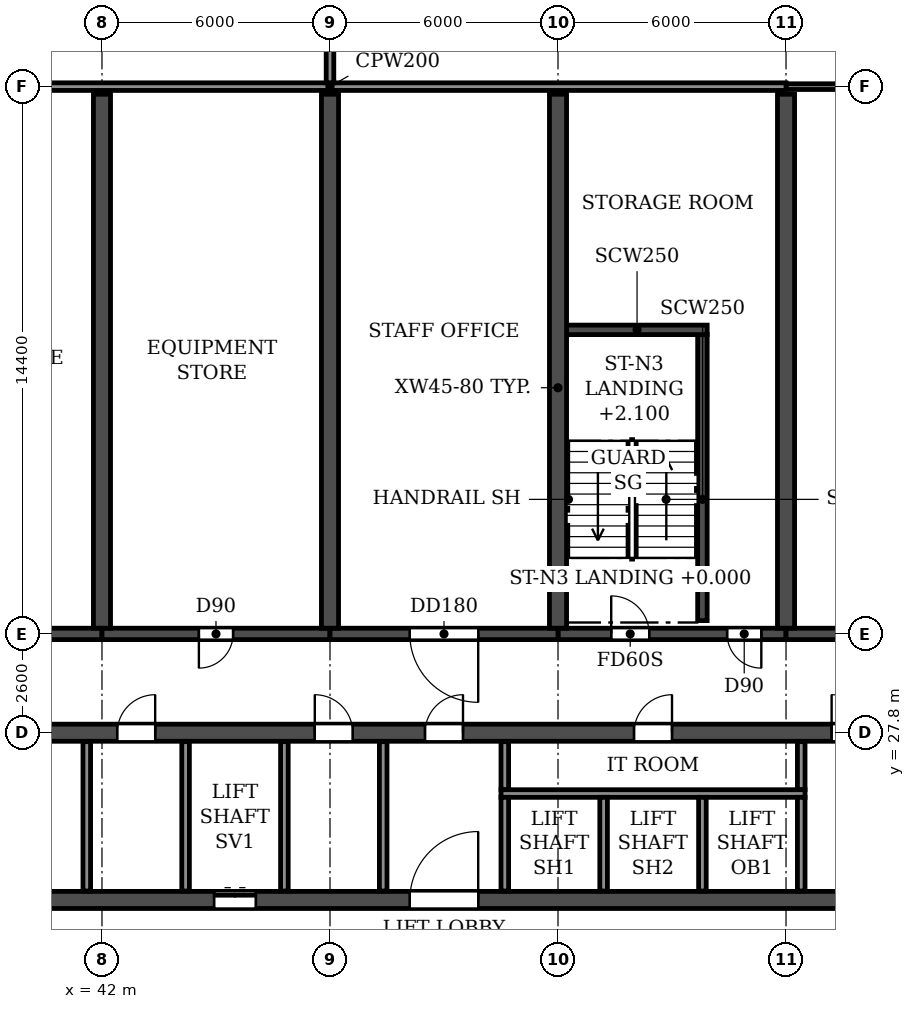
"""IFC4 building model, lengths in metres.
Left out: names, types, materials, properties, quantities, classifications, styles, units other than length and angle.
Written with IfcOpenShell. Run it as: python <this file> out.ifc"""

import sys

from ifc_helpers import new_model, si_unit, direction, frame, frame_2d, origin, place, context, subcontext, project, spatial, rectangle, extrude, element, fill, save


model = new_model("IFC4")
c1 = context("Model", 3, precision=1e-05, world=origin(), true_north=direction((0.0, 1.0)))
c2 = subcontext(c1, "Body", "Model", "MODEL_VIEW")
j1 = project(units=[si_unit("LENGTHUNIT", "METRE"), si_unit("PLANEANGLEUNIT", "RADIAN")], contexts=[c1])
p1 = place(None, origin())
s1 = spatial("IfcSite", under=j1, at=p1, CompositionType="ELEMENT")
p2 = place(p1, origin())
s2 = spatial("IfcBuilding", under=s1, at=p2, CompositionType="ELEMENT")
p3 = place(p2, frame((0.0, 0.0, 10.8)))
s3 = spatial("IfcBuildingStorey", under=s2, at=p3, CompositionType="ELEMENT", Elevation=10.8)
for number, where, z_axis, x_axis in (
    (1, (42.0, 30.55, 0.0), (0.0, 0.0, 1.0), (0.0, 1.0, 0.0)),
    (2, (48.0, 30.55, 0.0), (0.0, 0.0, 1.0), (0.0, 1.0, 0.0)),
    (3, (54.0, 30.55, 0.0), (0.0, 0.0, 1.0), (0.0, 1.0, 0.0)),
    (4, (60.0, 30.55, 0.0), (0.0, 0.0, 1.0), (0.0, 1.0, 0.0)),
):
    element("IfcWall", number, at=place(p3, frame(where, z_axis=z_axis, x_axis=x_axis)), inside=s3, PredefinedType="SHEAR", context=c2, shape_type="SweptSolid", body=[
        extrude(rectangle(XDim=14.05, YDim=0.45, at=frame_2d((7.025, 0.0))), origin(), (0.0, 0.0, 1.0), 3.92),
    ])
p4 = place(p3, frame((36.0, 30.4, 0.0), z_axis=(0.0, 0.0, 1.0), x_axis=(1.0, 0.0, 0.0)))
e5 = element("IfcWall", 5, at=p4, inside=s3, PredefinedType="SHEAR", context=c2, shape_type="SweptSolid", body=[
    extrude(rectangle(XDim=6.0, YDim=0.3, at=frame_2d((3.0, 0.0))), origin(), (0.0, 0.0, 1.0), 3.32),
])
p5 = place(p4, frame((2.1, 0.0, 0.0)))
e6 = element("IfcOpeningElement", 6, at=p5, cuts=e5, PredefinedType="OPENING", context=c2, shape_type="SweptSolid", body=[
    extrude(rectangle(XDim=1.8, YDim=2.1, at=frame_2d((0.9, 1.05))), frame((0.0, 0.16, 0.0), z_axis=(0.0, -1.0, 0.0), x_axis=(1.0, 0.0, 0.0)), (0.0, 0.0, 1.0), 0.32),
])
p6 = place(p3, frame((42.0, 30.4, 0.0), z_axis=(0.0, 0.0, 1.0), x_axis=(1.0, 0.0, 0.0)))
e7 = element("IfcWall", 7, at=p6, inside=s3, PredefinedType="SHEAR", context=c2, shape_type="SweptSolid", body=[
    extrude(rectangle(XDim=6.0, YDim=0.3, at=frame_2d((3.0, 0.0))), origin(), (0.0, 0.0, 1.0), 3.32),
])
p7 = place(p6, frame((2.55, 0.0, 0.0)))
e8 = element("IfcOpeningElement", 8, at=p7, cuts=e7, PredefinedType="OPENING", context=c2, shape_type="SweptSolid", body=[
    extrude(rectangle(XDim=0.9, YDim=2.1, at=frame_2d((0.45, 1.05))), frame((0.0, 0.16, 0.0), z_axis=(0.0, -1.0, 0.0), x_axis=(1.0, 0.0, 0.0)), (0.0, 0.0, 1.0), 0.32),
])
p8 = place(p3, frame((48.0, 30.4, 0.0), z_axis=(0.0, 0.0, 1.0), x_axis=(1.0, 0.0, 0.0)))
e9 = element("IfcWall", 9, at=p8, inside=s3, PredefinedType="SHEAR", context=c2, shape_type="SweptSolid", body=[
    extrude(rectangle(XDim=6.0, YDim=0.3, at=frame_2d((3.0, 0.0))), origin(), (0.0, 0.0, 1.0), 3.32),
])
p9 = place(p8, frame((2.1, 0.0, 0.0)))
e10 = element("IfcOpeningElement", 10, at=p9, cuts=e9, PredefinedType="OPENING", context=c2, shape_type="SweptSolid", body=[
    extrude(rectangle(XDim=1.8, YDim=2.1, at=frame_2d((0.9, 1.05))), frame((0.0, 0.16, 0.0), z_axis=(0.0, -1.0, 0.0), x_axis=(1.0, 0.0, 0.0)), (0.0, 0.0, 1.0), 0.32),
])
p10 = place(p3, frame((54.0, 30.4, 0.0), z_axis=(0.0, 0.0, 1.0), x_axis=(1.0, 0.0, 0.0)))
e11 = element("IfcWall", 11, at=p10, inside=s3, PredefinedType="SHEAR", context=c2, shape_type="SweptSolid", body=[
    extrude(rectangle(XDim=6.0, YDim=0.3, at=frame_2d((3.0, 0.0))), origin(), (0.0, 0.0, 1.0), 3.32),
])
p11 = place(p10, frame((1.4, 0.0, 0.0)))
e12 = element("IfcOpeningElement", 12, at=p11, cuts=e11, PredefinedType="OPENING", context=c2, shape_type="SweptSolid", body=[
    extrude(rectangle(XDim=1.0, YDim=2.1, at=frame_2d((0.5, 1.05))), frame((0.0, 0.16, 0.0), z_axis=(0.0, -1.0, 0.0), x_axis=(1.0, 0.0, 0.0)), (0.0, 0.0, 1.0), 0.32),
])
p12 = place(p10, frame((4.45, 0.0, 0.0)))
e13 = element("IfcOpeningElement", 13, at=p12, cuts=e11, PredefinedType="OPENING", context=c2, shape_type="SweptSolid", body=[
    extrude(rectangle(XDim=0.9, YDim=2.1, at=frame_2d((0.45, 1.05))), frame((0.0, 0.16, 0.0), z_axis=(0.0, -1.0, 0.0), x_axis=(1.0, 0.0, 0.0)), (0.0, 0.0, 1.0), 0.32),
])
p13 = place(p3, frame((60.0, 30.4, 0.0), z_axis=(0.0, 0.0, 1.0), x_axis=(1.0, 0.0, 0.0)))
e14 = element("IfcWall", 14, at=p13, inside=s3, PredefinedType="SHEAR", context=c2, shape_type="SweptSolid", body=[
    extrude(rectangle(XDim=6.0, YDim=0.3, at=frame_2d((3.0, 0.0))), origin(), (0.0, 0.0, 1.0), 3.32),
])
p14 = place(p13, frame((2.55, 0.0, 0.0)))
e15 = element("IfcOpeningElement", 15, at=p14, cuts=e14, PredefinedType="OPENING", context=c2, shape_type="SweptSolid", body=[
    extrude(rectangle(XDim=0.9, YDim=2.1, at=frame_2d((0.45, 1.05))), frame((0.0, 0.16, 0.0), z_axis=(0.0, -1.0, 0.0), x_axis=(1.0, 0.0, 0.0)), (0.0, 0.0, 1.0), 0.32),
])
p15 = place(p3, frame((18.0, 27.8, 0.0), z_axis=(0.0, 0.0, 1.0), x_axis=(1.0, 0.0, 0.0)))
e16 = element("IfcWall", 16, at=p15, inside=s3, PredefinedType="SOLIDWALL", context=c2, shape_type="SweptSolid", body=[
    extrude(rectangle(XDim=66.0, YDim=0.45, at=frame_2d((33.0, 0.0))), origin(), (0.0, 0.0, 1.0), 3.92),
])
p16 = place(p15, frame((0.9, 0.0, 0.0)))
e17 = element("IfcOpeningElement", 17, at=p16, cuts=e16, PredefinedType="OPENING", context=c2, shape_type="SweptSolid", body=[
    extrude(rectangle(XDim=1.0, YDim=2.1, at=frame_2d((0.5, 1.05))), frame((0.0, 0.235, 0.0), z_axis=(0.0, -1.0, 0.0), x_axis=(1.0, 0.0, 0.0)), (0.0, 0.0, 1.0), 0.47),
])
p17 = place(p15, frame((4.25, 0.0, 0.0)))
e18 = element("IfcOpeningElement", 18, at=p17, cuts=e16, PredefinedType="OPENING", context=c2, shape_type="SweptSolid", body=[
    extrude(rectangle(XDim=0.9, YDim=2.1, at=frame_2d((0.45, 1.05))), frame((0.0, 0.235, 0.0), z_axis=(0.0, -1.0, 0.0), x_axis=(1.0, 0.0, 0.0)), (0.0, 0.0, 1.0), 0.47),
])
p18 = place(p15, frame((8.85, 0.0, 0.0)))
e19 = element("IfcOpeningElement", 19, at=p18, cuts=e16, PredefinedType="OPENING", context=c2, shape_type="SweptSolid", body=[
    extrude(rectangle(XDim=0.9, YDim=2.1, at=frame_2d((0.45, 1.05))), frame((0.0, 0.235, 0.0), z_axis=(0.0, -1.0, 0.0), x_axis=(1.0, 0.0, 0.0)), (0.0, 0.0, 1.0), 0.47),
])
p19 = place(p15, frame((13.45, 0.0, 0.0)))
e20 = element("IfcOpeningElement", 20, at=p19, cuts=e16, PredefinedType="OPENING", context=c2, shape_type="SweptSolid", body=[
    extrude(rectangle(XDim=0.9, YDim=2.1, at=frame_2d((0.45, 1.05))), frame((0.0, 0.235, 0.0), z_axis=(0.0, -1.0, 0.0), x_axis=(1.0, 0.0, 0.0)), (0.0, 0.0, 1.0), 0.47),
])
p20 = place(p15, frame((18.95, 0.0, 0.0)))
e21 = element("IfcOpeningElement", 21, at=p20, cuts=e16, PredefinedType="OPENING", context=c2, shape_type="SweptSolid", body=[
    extrude(rectangle(XDim=1.5, YDim=2.1, at=frame_2d((0.75, 1.05))), frame((0.0, 0.235, 0.0), z_axis=(0.0, -1.0, 0.0), x_axis=(1.0, 0.0, 0.0)), (0.0, 0.0, 1.0), 0.47),
])
p21 = place(p15, frame((24.4, 0.0, 0.0)))
e22 = element("IfcOpeningElement", 22, at=p21, cuts=e16, PredefinedType="OPENING", context=c2, shape_type="SweptSolid", body=[
    extrude(rectangle(XDim=1.0, YDim=2.1, at=frame_2d((0.5, 1.05))), frame((0.0, 0.235, 0.0), z_axis=(0.0, -1.0, 0.0), x_axis=(1.0, 0.0, 0.0)), (0.0, 0.0, 1.0), 0.47),
])
p22 = place(p15, frame((29.6, 0.0, 0.0)))
e23 = element("IfcOpeningElement", 23, at=p22, cuts=e16, PredefinedType="OPENING", context=c2, shape_type="SweptSolid", body=[
    extrude(rectangle(XDim=1.0, YDim=2.1, at=frame_2d((0.5, 1.05))), frame((0.0, 0.235, 0.0), z_axis=(0.0, -1.0, 0.0), x_axis=(1.0, 0.0, 0.0)), (0.0, 0.0, 1.0), 0.47),
])
p23 = place(p15, frame((32.5, 0.0, 0.0)))
e24 = element("IfcOpeningElement", 24, at=p23, cuts=e16, PredefinedType="OPENING", context=c2, shape_type="SweptSolid", body=[
    extrude(rectangle(XDim=1.0, YDim=2.1, at=frame_2d((0.5, 1.05))), frame((0.0, 0.235, 0.0), z_axis=(0.0, -1.0, 0.0), x_axis=(1.0, 0.0, 0.0)), (0.0, 0.0, 1.0), 0.47),
])
p24 = place(p15, frame((38.0, 0.0, 0.0)))
e25 = element("IfcOpeningElement", 25, at=p24, cuts=e16, PredefinedType="OPENING", context=c2, shape_type="SweptSolid", body=[
    extrude(rectangle(XDim=1.0, YDim=2.1, at=frame_2d((0.5, 1.05))), frame((0.0, 0.235, 0.0), z_axis=(0.0, -1.0, 0.0), x_axis=(1.0, 0.0, 0.0)), (0.0, 0.0, 1.0), 0.47),
])
p25 = place(p15, frame((43.2, 0.0, 0.0)))
e26 = element("IfcOpeningElement", 26, at=p25, cuts=e16, PredefinedType="OPENING", context=c2, shape_type="SweptSolid", body=[
    extrude(rectangle(XDim=1.0, YDim=2.1, at=frame_2d((0.5, 1.05))), frame((0.0, 0.235, 0.0), z_axis=(0.0, -1.0, 0.0), x_axis=(1.0, 0.0, 0.0)), (0.0, 0.0, 1.0), 0.47),
])
p26 = place(p15, frame((47.1, 0.0, 0.0)))
e27 = element("IfcOpeningElement", 27, at=p26, cuts=e16, PredefinedType="OPENING", context=c2, shape_type="SweptSolid", body=[
    extrude(rectangle(XDim=1.0, YDim=2.1, at=frame_2d((0.5, 1.05))), frame((0.0, 0.235, 0.0), z_axis=(0.0, -1.0, 0.0), x_axis=(1.0, 0.0, 0.0)), (0.0, 0.0, 1.0), 0.47),
])
p27 = place(p15, frame((51.65, 0.0, 0.0)))
e28 = element("IfcOpeningElement", 28, at=p27, cuts=e16, PredefinedType="OPENING", context=c2, shape_type="SweptSolid", body=[
    extrude(rectangle(XDim=0.9, YDim=2.1, at=frame_2d((0.45, 1.05))), frame((0.0, 0.235, 0.0), z_axis=(0.0, -1.0, 0.0), x_axis=(1.0, 0.0, 0.0)), (0.0, 0.0, 1.0), 0.47),
])
p28 = place(p15, frame((56.2, 0.0, 0.0)))
e29 = element("IfcOpeningElement", 29, at=p28, cuts=e16, PredefinedType="OPENING", context=c2, shape_type="SweptSolid", body=[
    extrude(rectangle(XDim=1.0, YDim=2.1, at=frame_2d((0.5, 1.05))), frame((0.0, 0.235, 0.0), z_axis=(0.0, -1.0, 0.0), x_axis=(1.0, 0.0, 0.0)), (0.0, 0.0, 1.0), 0.47),
])
p29 = place(p15, frame((60.85, 0.0, 0.0)))
e30 = element("IfcOpeningElement", 30, at=p29, cuts=e16, PredefinedType="OPENING", context=c2, shape_type="SweptSolid", body=[
    extrude(rectangle(XDim=0.9, YDim=2.1, at=frame_2d((0.45, 1.05))), frame((0.0, 0.235, 0.0), z_axis=(0.0, -1.0, 0.0), x_axis=(1.0, 0.0, 0.0)), (0.0, 0.0, 1.0), 0.47),
])
p30 = place(p15, frame((64.1, 0.0, 0.0)))
e31 = element("IfcOpeningElement", 31, at=p30, cuts=e16, PredefinedType="OPENING", context=c2, shape_type="SweptSolid", body=[
    extrude(rectangle(XDim=1.0, YDim=2.1, at=frame_2d((0.5, 1.05))), frame((0.0, 0.235, 0.0), z_axis=(0.0, -1.0, 0.0), x_axis=(1.0, 0.0, 0.0)), (0.0, 0.0, 1.0), 0.47),
])
p31 = place(p3, frame((33.925, 23.4, 0.0), z_axis=(0.0, 0.0, 1.0), x_axis=(1.0, 0.0, 0.0)))
e32 = element("IfcWall", 32, at=p31, inside=s3, PredefinedType="SOLIDWALL", context=c2, shape_type="SweptSolid", body=[
    extrude(rectangle(XDim=34.15, YDim=0.45, at=frame_2d((17.075, 0.0))), origin(), (0.0, 0.0, 1.0), 3.92),
])
p32 = place(p31, frame((16.175, 0.0, 0.0)))
e33 = element("IfcOpeningElement", 33, at=p32, cuts=e32, PredefinedType="OPENING", context=c2, shape_type="SweptSolid", body=[
    extrude(rectangle(XDim=1.8, YDim=2.1, at=frame_2d((0.9, 1.05))), frame((0.0, 0.235, 0.0), z_axis=(0.0, -1.0, 0.0), x_axis=(1.0, 0.0, 0.0)), (0.0, 0.0, 1.0), 0.47),
])
p33 = place(p31, frame((11.025, 0.0, 0.0)))
e34 = element("IfcOpeningElement", 34, at=p33, cuts=e32, PredefinedType="OPENING", context=c2, shape_type="SweptSolid", body=[
    extrude(rectangle(XDim=1.1, YDim=2.1, at=frame_2d((0.55, 1.05))), frame((0.0, 0.235, 0.0), z_axis=(0.0, -1.0, 0.0), x_axis=(1.0, 0.0, 0.0)), (0.0, 0.0, 1.0), 0.47),
])
p34 = place(p31, frame((29.825, 0.0, 0.0)))
e35 = element("IfcOpeningElement", 35, at=p34, cuts=e32, PredefinedType="OPENING", context=c2, shape_type="SweptSolid", body=[
    extrude(rectangle(XDim=1.1, YDim=2.1, at=frame_2d((0.55, 1.05))), frame((0.0, 0.235, 0.0), z_axis=(0.0, -1.0, 0.0), x_axis=(1.0, 0.0, 0.0)), (0.0, 0.0, 1.0), 0.47),
])
p35 = place(p31, frame((32.425, 0.0, 0.0)))
e36 = element("IfcOpeningElement", 36, at=p35, cuts=e32, PredefinedType="OPENING", context=c2, shape_type="SweptSolid", body=[
    extrude(rectangle(XDim=1.1, YDim=2.1, at=frame_2d((0.55, 1.05))), frame((0.0, 0.235, 0.0), z_axis=(0.0, -1.0, 0.0), x_axis=(1.0, 0.0, 0.0)), (0.0, 0.0, 1.0), 0.47),
])
p36 = place(p3, frame((57.8, 30.75, 0.0), z_axis=(0.0, 0.0, 1.0), x_axis=(0.0, 1.0, 0.0)))
e37 = element("IfcWall", 37, at=p36, inside=s3, PredefinedType="SOLIDWALL", context=c2, shape_type="SweptSolid", body=[
    extrude(rectangle(XDim=7.525, YDim=0.25, at=frame_2d((3.762, 0.0))), origin(), (0.0, 0.0, 1.0), 3.92),
])
p37 = place(p3, frame((54.0, 38.4, 0.0), z_axis=(0.0, 0.0, 1.0), x_axis=(1.0, 0.0, 0.0)))
e38 = element("IfcWall", 38, at=p37, inside=s3, PredefinedType="SOLIDWALL", context=c2, shape_type="SweptSolid", body=[
    extrude(rectangle(XDim=3.925, YDim=0.25, at=frame_2d((1.962, 0.0))), origin(), (0.0, 0.0, 1.0), 3.92),
])
p38 = place(p3, frame((60.0, 44.8, 0.0), z_axis=(0.0, 0.0, 1.0), x_axis=(1.0, 0.0, 0.0)))
e39 = element("IfcWall", 39, at=p38, inside=s3, PredefinedType="PARTITIONING", context=c2, shape_type="SweptSolid", body=[
    extrude(rectangle(XDim=6.0, YDim=0.15, at=frame_2d((3.0, 0.0))), origin(), (0.0, 0.0, 1.0), 3.92),
])
p39 = place(p38, frame((2.1, 0.0, 0.0)))
e40 = element("IfcOpeningElement", 40, at=p39, cuts=e39, PredefinedType="OPENING", context=c2, shape_type="SweptSolid", body=[
    extrude(rectangle(XDim=1.8, YDim=2.1, at=frame_2d((0.9, 1.05))), frame((0.0, 0.085, 0.0), z_axis=(0.0, -1.0, 0.0), x_axis=(1.0, 0.0, 0.0)), (0.0, 0.0, 1.0), 0.17),
])
for number, where, z_axis, x_axis in (
    (41, (41.6, 23.635, 0.0), (0.0, 0.0, 1.0), (0.0, 1.0, 0.0)),
    (42, (49.4, 23.635, 0.0), (0.0, 0.0, 1.0), (0.0, 1.0, 0.0)),
):
    element("IfcWall", number, at=place(p3, frame(where, z_axis=z_axis, x_axis=x_axis)), inside=s3, PredefinedType="PARTITIONING", context=c2, shape_type="SweptSolid", body=[
        extrude(rectangle(XDim=3.93, YDim=0.2, at=frame_2d((1.965, 0.0))), origin(), (0.0, 0.0, 1.0), 3.92),
    ])
for number, where, z_axis, x_axis in (
    (43, (52.6, 26.3, 0.0), (0.0, 0.0, 1.0), (0.0, 1.0, 0.0)),
    (44, (60.4, 26.3, 0.0), (0.0, 0.0, 1.0), (0.0, 1.0, 0.0)),
):
    element("IfcWall", number, at=place(p3, frame(where, z_axis=z_axis, x_axis=x_axis)), inside=s3, PredefinedType="PARTITIONING", context=c2, shape_type="SweptSolid", body=[
        extrude(rectangle(XDim=1.265, YDim=0.2, at=frame_2d((0.632, 0.0))), origin(), (0.0, 0.0, 1.0), 3.92),
    ])
p40 = place(p3, frame((36.0, 44.8, 0.0), z_axis=(0.0, 0.0, 1.0), x_axis=(1.0, 0.0, 0.0)))
e45 = element("IfcWall", 45, at=p40, inside=s3, PredefinedType="PARTITIONING", context=c2, shape_type="SweptSolid", body=[
    extrude(rectangle(XDim=24.0, YDim=0.2, at=frame_2d((12.0, 0.0))), origin(), (0.0, 0.0, 1.0), 3.92),
])
p41 = place(p3, frame((48.0, 44.9, 0.0), z_axis=(0.0, 0.0, 1.0), x_axis=(0.0, 1.0, 0.0)))
e46 = element("IfcWall", 46, at=p41, inside=s3, PredefinedType="PARTITIONING", context=c2, shape_type="SweptSolid", body=[
    extrude(rectangle(XDim=17.84, YDim=0.2, at=frame_2d((8.92, 0.0))), origin(), (0.0, 0.0, 1.0), 3.92),
])
p42 = place(p3, frame((52.5, 26.2, 0.0), z_axis=(0.0, 0.0, 1.0), x_axis=(1.0, 0.0, 0.0)))
e47 = element("IfcWall", 47, at=p42, inside=s3, PredefinedType="PARTITIONING", context=c2, shape_type="SweptSolid", body=[
    extrude(rectangle(XDim=8.0, YDim=0.2, at=frame_2d((4.0, 0.0))), origin(), (0.0, 0.0, 1.0), 3.92),
])
for number, where, z_axis, x_axis in (
    (48, (44.2, 23.635, 0.0), (0.0, 0.0, 1.0), (0.0, 1.0, 0.0)),
    (49, (46.8, 23.635, 0.0), (0.0, 0.0, 1.0), (0.0, 1.0, 0.0)),
):
    element("IfcWall", number, at=place(p3, frame(where, z_axis=z_axis, x_axis=x_axis)), inside=s3, PredefinedType="PARTITIONING", context=c2, shape_type="SweptSolid", body=[
        extrude(rectangle(XDim=3.93, YDim=0.2, at=frame_2d((1.965, 0.0))), origin(), (0.0, 0.0, 1.0), 3.92),
    ])
for number, where, z_axis, x_axis in (
    (50, (52.6, 23.635, 0.0), (0.0, 0.0, 1.0), (0.0, 1.0, 0.0)),
    (51, (55.2, 23.635, 0.0), (0.0, 0.0, 1.0), (0.0, 1.0, 0.0)),
    (52, (57.8, 23.635, 0.0), (0.0, 0.0, 1.0), (0.0, 1.0, 0.0)),
    (53, (60.4, 23.635, 0.0), (0.0, 0.0, 1.0), (0.0, 1.0, 0.0)),
):
    element("IfcWall", number, at=place(p3, frame(where, z_axis=z_axis, x_axis=x_axis)), inside=s3, PredefinedType="PARTITIONING", context=c2, shape_type="SweptSolid", body=[
        extrude(rectangle(XDim=2.465, YDim=0.2, at=frame_2d((1.232, 0.0))), origin(), (0.0, 0.0, 1.0), 3.92),
    ])
p43 = place(p21, origin())
e54 = element("IfcDoor", 54, at=p43, inside=s3, OperationType="SINGLE_SWING_RIGHT", PredefinedType="DOOR", context=c2, shape_type="SweptSolid", body=[
    extrude(rectangle(XDim=1.0, YDim=2.1, at=frame_2d((0.5, 1.05))), frame((0.0, 0.025, 0.0), z_axis=(0.0, -1.0, 0.0), x_axis=(1.0, 0.0, 0.0)), (0.0, 0.0, 1.0), 0.05),
])
fill(e22, e54)
p44 = place(p7, frame((0.9, 0.0, 0.0), z_axis=(0.0, 0.0, 1.0), x_axis=(-1.0, 0.0, 0.0)))
e55 = element("IfcDoor", 55, at=p44, inside=s3, OperationType="SINGLE_SWING_RIGHT", PredefinedType="DOOR", context=c2, shape_type="SweptSolid", body=[
    extrude(rectangle(XDim=0.9, YDim=2.1, at=frame_2d((0.45, 1.05))), frame((0.0, 0.025, 0.0), z_axis=(0.0, -1.0, 0.0), x_axis=(1.0, 0.0, 0.0)), (0.0, 0.0, 1.0), 0.05),
])
fill(e8, e55)
p45 = place(p22, origin())
e56 = element("IfcDoor", 56, at=p45, inside=s3, OperationType="SINGLE_SWING_LEFT", PredefinedType="DOOR", context=c2, shape_type="SweptSolid", body=[
    extrude(rectangle(XDim=1.0, YDim=2.1, at=frame_2d((0.5, 1.05))), frame((0.0, 0.025, 0.0), z_axis=(0.0, -1.0, 0.0), x_axis=(1.0, 0.0, 0.0)), (0.0, 0.0, 1.0), 0.05),
])
fill(e23, e56)
p46 = place(p23, origin())
e57 = element("IfcDoor", 57, at=p46, inside=s3, OperationType="SINGLE_SWING_RIGHT", PredefinedType="DOOR", context=c2, shape_type="SweptSolid", body=[
    extrude(rectangle(XDim=1.0, YDim=2.1, at=frame_2d((0.5, 1.05))), frame((0.0, 0.025, 0.0), z_axis=(0.0, -1.0, 0.0), x_axis=(1.0, 0.0, 0.0)), (0.0, 0.0, 1.0), 0.05),
])
fill(e24, e57)
p47 = place(p9, frame((1.8, 0.0, 0.0), z_axis=(0.0, 0.0, 1.0), x_axis=(-1.0, 0.0, 0.0)))
e58 = element("IfcDoor", 58, at=p47, inside=s3, OperationType="DOUBLE_DOOR_SINGLE_SWING", PredefinedType="DOOR", context=c2, shape_type="SweptSolid", body=[
    extrude(rectangle(XDim=1.8, YDim=2.1, at=frame_2d((0.9, 1.05))), frame((0.0, 0.025, 0.0), z_axis=(0.0, -1.0, 0.0), x_axis=(1.0, 0.0, 0.0)), (0.0, 0.0, 1.0), 0.05),
])
fill(e10, e58)
p48 = place(p11, origin())
e59 = element("IfcDoor", 59, at=p48, inside=s3, OperationType="SINGLE_SWING_LEFT", PredefinedType="DOOR", context=c2, shape_type="SweptSolid", body=[
    extrude(rectangle(XDim=1.0, YDim=2.1, at=frame_2d((0.5, 1.05))), frame((0.0, 0.025, 0.0), z_axis=(0.0, -1.0, 0.0), x_axis=(1.0, 0.0, 0.0)), (0.0, 0.0, 1.0), 0.05),
])
fill(e12, e59)
p49 = place(p24, origin())
e60 = element("IfcDoor", 60, at=p49, inside=s3, OperationType="SINGLE_SWING_RIGHT", PredefinedType="DOOR", context=c2, shape_type="SweptSolid", body=[
    extrude(rectangle(XDim=1.0, YDim=2.1, at=frame_2d((0.5, 1.05))), frame((0.0, 0.025, 0.0), z_axis=(0.0, -1.0, 0.0), x_axis=(1.0, 0.0, 0.0)), (0.0, 0.0, 1.0), 0.05),
])
fill(e25, e60)
p50 = place(p12, frame((0.9, 0.0, 0.0), z_axis=(0.0, 0.0, 1.0), x_axis=(-1.0, 0.0, 0.0)))
e61 = element("IfcDoor", 61, at=p50, inside=s3, OperationType="SINGLE_SWING_LEFT", PredefinedType="DOOR", context=c2, shape_type="SweptSolid", body=[
    extrude(rectangle(XDim=0.9, YDim=2.1, at=frame_2d((0.45, 1.05))), frame((0.0, 0.025, 0.0), z_axis=(0.0, -1.0, 0.0), x_axis=(1.0, 0.0, 0.0)), (0.0, 0.0, 1.0), 0.05),
])
fill(e13, e61)
p51 = place(p25, origin())
e62 = element("IfcDoor", 62, at=p51, inside=s3, OperationType="SINGLE_SWING_LEFT", PredefinedType="DOOR", context=c2, shape_type="SweptSolid", body=[
    extrude(rectangle(XDim=1.0, YDim=2.1, at=frame_2d((0.5, 1.05))), frame((0.0, 0.025, 0.0), z_axis=(0.0, -1.0, 0.0), x_axis=(1.0, 0.0, 0.0)), (0.0, 0.0, 1.0), 0.05),
])
fill(e26, e62)
p52 = place(p32, origin())
e63 = element("IfcDoor", 63, at=p52, inside=s3, OperationType="DOUBLE_DOOR_SINGLE_SWING", PredefinedType="DOOR", context=c2, shape_type="SweptSolid", body=[
    extrude(rectangle(XDim=1.8, YDim=2.1, at=frame_2d((0.9, 1.05))), frame((0.0, 0.025, 0.0), z_axis=(0.0, -1.0, 0.0), x_axis=(1.0, 0.0, 0.0)), (0.0, 0.0, 1.0), 0.05),
])
fill(e33, e63)
p53 = place(p33, origin())
e64 = element("IfcDoor", 64, at=p53, inside=s3, OperationType="DOUBLE_DOOR_SLIDING", PredefinedType="DOOR", context=c2, shape_type="SweptSolid", body=[
    extrude(rectangle(XDim=1.1, YDim=2.1, at=frame_2d((0.55, 1.05))), frame((0.0, 0.025, 0.0), z_axis=(0.0, -1.0, 0.0), x_axis=(1.0, 0.0, 0.0)), (0.0, 0.0, 1.0), 0.05),
])
fill(e34, e64)
save(model, sys.argv[1])
